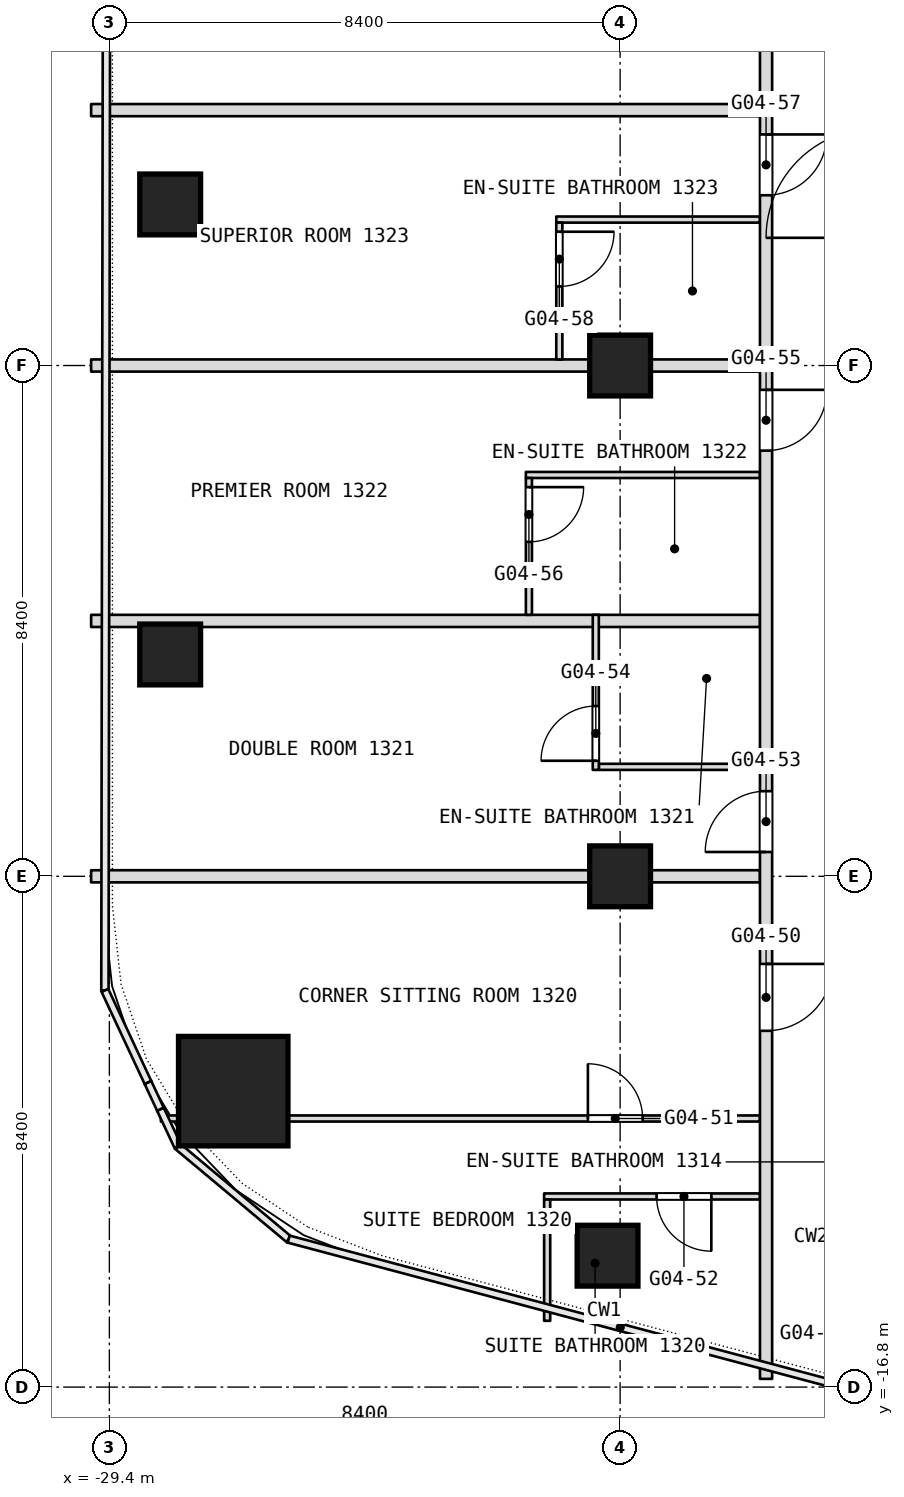
"""IFC4 building model, lengths in metres.
Left out: names, types, materials, properties, quantities, classifications, styles, units other than length and angle.
Written with IfcOpenShell. Run it as: python <this file> out.ifc"""

import sys

from ifc_helpers import new_model, si_unit, direction, frame, frame_2d, origin, origin_2d, place, context, subcontext, project, spatial, rectangle, extrude, element, fill, save


model = new_model("IFC4")
c1 = context("Model", 3, precision=1e-05, world=origin(), true_north=direction((0.0, 1.0)))
c2 = subcontext(c1, "Body", "Model", "MODEL_VIEW")
j1 = project(units=[si_unit("LENGTHUNIT", "METRE"), si_unit("PLANEANGLEUNIT", "RADIAN")], contexts=[c1])
p1 = place(None, origin())
s1 = spatial("IfcSite", under=j1, at=p1, CompositionType="ELEMENT")
p2 = place(p1, origin())
s2 = spatial("IfcBuilding", under=s1, at=p2, CompositionType="ELEMENT")
p3 = place(p2, frame((0.0, 0.0, 61.7)))
s3 = spatial("IfcBuildingStorey", under=s2, at=p3, CompositionType="ELEMENT", Elevation=61.7)
p4 = place(p3, frame((-27.363, -11.933, 0.0), z_axis=(0.0, 0.0, 1.0), x_axis=(1.0, 0.0, 0.0)))
e1 = element("IfcColumn", 1, at=p4, inside=s3, PredefinedType="COLUMN", context=c2, shape_type="SweptSolid", body=[
    extrude(rectangle(XDim=1.8, YDim=1.8, at=origin_2d()), origin(), (0.0, 0.0, 1.0), 3.6),
])
for number, where, z_axis, x_axis in (
    (2, (-21.0, -8.4, 0.0), (0.0, 0.0, 1.0), (1.0, 0.0, 0.0)),
    (3, (-21.0, 0.0, 0.0), (0.0, 0.0, 1.0), (1.0, 0.0, 0.0)),
    (4, (-28.4, -4.752, 0.0), (0.0, 0.0, 1.0), (1.0, 0.0, 0.0)),
    (5, (-28.4, 2.649, 0.0), (0.0, 0.0, 1.0), (1.0, 0.0, 0.0)),
    (6, (-21.207, -14.639, 0.0), (0.0, 0.0, 1.0), (1.0, 0.0, 0.0)),
):
    element("IfcColumn", number, at=place(p3, frame(where, z_axis=z_axis, x_axis=x_axis)), inside=s3, PredefinedType="COLUMN", context=c2, shape_type="SweptSolid", body=[
        extrude(rectangle(XDim=1.0, YDim=1.0, at=origin_2d()), origin(), (0.0, 0.0, 1.0), 3.6),
    ])
p5 = place(p3, frame((-22.25, -13.665, 0.0), z_axis=(0.0, 0.0, 1.0), x_axis=(1.0, 0.0, 0.0)))
e7 = element("IfcWall", 7, at=p5, inside=s3, PredefinedType="PARTITIONING", context=c2, shape_type="SweptSolid", body=[
    extrude(rectangle(XDim=3.55, YDim=0.1, at=frame_2d((1.775, 0.0))), origin(), (0.0, 0.0, 1.0), 3.34),
])
p6 = place(p5, frame((1.85, 0.0, 0.0)))
e8 = element("IfcOpeningElement", 8, at=p6, cuts=e7, PredefinedType="OPENING", context=c2, shape_type="SweptSolid", body=[
    extrude(rectangle(XDim=0.9, YDim=2.1, at=frame_2d((0.45, 1.05))), frame((0.0, 0.05, 0.0), z_axis=(0.0, -1.0, 0.0), x_axis=(1.0, 0.0, 0.0)), (0.0, 0.0, 1.0), 0.1),
])
p7 = place(p3, frame((-28.553, -12.383, 0.0), z_axis=(0.0, 0.0, 1.0), x_axis=(1.0, 0.0, 0.0)))
e9 = element("IfcWall", 9, at=p7, inside=s3, PredefinedType="PARTITIONING", context=c2, shape_type="SweptSolid", body=[
    extrude(rectangle(XDim=0.29, YDim=0.1, at=frame_2d((0.145, 0.0))), origin(), (0.0, 0.0, 1.0), 3.34),
])
p8 = place(p3, frame((-26.463, -12.383, 0.0), z_axis=(0.0, 0.0, 1.0), x_axis=(1.0, 0.0, 0.0)))
e10 = element("IfcWall", 10, at=p8, inside=s3, PredefinedType="PARTITIONING", context=c2, shape_type="SweptSolid", body=[
    extrude(rectangle(XDim=7.763, YDim=0.1, at=frame_2d((3.881, 0.0))), origin(), (0.0, 0.0, 1.0), 3.34),
])
p9 = place(p8, frame((4.933, 0.0, 0.0)))
e11 = element("IfcOpeningElement", 11, at=p9, cuts=e10, PredefinedType="OPENING", context=c2, shape_type="SweptSolid", body=[
    extrude(rectangle(XDim=0.9, YDim=2.1, at=frame_2d((0.45, 1.05))), frame((0.0, 0.05, 0.0), z_axis=(0.0, -1.0, 0.0), x_axis=(1.0, 0.0, 0.0)), (0.0, 0.0, 1.0), 0.1),
])
p10 = place(p3, frame((-29.7, -8.4, 0.0), z_axis=(0.0, 0.0, 1.0), x_axis=(1.0, 0.0, 0.0)))
e12 = element("IfcWall", 12, at=p10, inside=s3, PredefinedType="PARTITIONING", context=c2, shape_type="SweptSolid", body=[
    extrude(rectangle(XDim=11.0, YDim=0.2, at=frame_2d((5.5, 0.0))), origin(), (0.0, 0.0, 1.0), 2.84),
])
p11 = place(p3, frame((-21.35, -6.6, 0.0), z_axis=(0.0, 0.0, 1.0), x_axis=(1.0, 0.0, 0.0)))
e13 = element("IfcWall", 13, at=p11, inside=s3, PredefinedType="PARTITIONING", context=c2, shape_type="SweptSolid", body=[
    extrude(rectangle(XDim=2.65, YDim=0.1, at=frame_2d((1.325, 0.0))), origin(), (0.0, 0.0, 1.0), 3.34),
])
p12 = place(p3, frame((-29.7, -4.2, 0.0), z_axis=(0.0, 0.0, 1.0), x_axis=(1.0, 0.0, 0.0)))
e14 = element("IfcWall", 14, at=p12, inside=s3, PredefinedType="PARTITIONING", context=c2, shape_type="SweptSolid", body=[
    extrude(rectangle(XDim=11.0, YDim=0.2, at=frame_2d((5.5, 0.0))), origin(), (0.0, 0.0, 1.0), 3.34),
])
p13 = place(p3, frame((-22.55, -1.8, 0.0), z_axis=(0.0, 0.0, 1.0), x_axis=(1.0, 0.0, 0.0)))
e15 = element("IfcWall", 15, at=p13, inside=s3, PredefinedType="PARTITIONING", context=c2, shape_type="SweptSolid", body=[
    extrude(rectangle(XDim=3.85, YDim=0.1, at=frame_2d((1.925, 0.0))), origin(), (0.0, 0.0, 1.0), 3.34),
])
p14 = place(p3, frame((-29.7, 0.0, 0.0), z_axis=(0.0, 0.0, 1.0), x_axis=(1.0, 0.0, 0.0)))
e16 = element("IfcWall", 16, at=p14, inside=s3, PredefinedType="PARTITIONING", context=c2, shape_type="SweptSolid", body=[
    extrude(rectangle(XDim=11.0, YDim=0.2, at=frame_2d((5.5, 0.0))), origin(), (0.0, 0.0, 1.0), 2.84),
])
p15 = place(p3, frame((-22.05, 2.4, 0.0), z_axis=(0.0, 0.0, 1.0), x_axis=(1.0, 0.0, 0.0)))
e17 = element("IfcWall", 17, at=p15, inside=s3, PredefinedType="PARTITIONING", context=c2, shape_type="SweptSolid", body=[
    extrude(rectangle(XDim=3.35, YDim=0.1, at=frame_2d((1.675, 0.0))), origin(), (0.0, 0.0, 1.0), 3.34),
])
p16 = place(p3, frame((-29.7, 4.2, 0.0), z_axis=(0.0, 0.0, 1.0), x_axis=(1.0, 0.0, 0.0)))
e18 = element("IfcWall", 18, at=p16, inside=s3, PredefinedType="PARTITIONING", context=c2, shape_type="SweptSolid", body=[
    extrude(rectangle(XDim=11.0, YDim=0.2, at=frame_2d((5.5, 0.0))), origin(), (0.0, 0.0, 1.0), 3.34),
])
p17 = place(p3, frame((-18.6, -16.665, 0.0), z_axis=(0.0, 0.0, 1.0), x_axis=(0.0, 1.0, 0.0)))
e19 = element("IfcWall", 19, at=p17, inside=s3, PredefinedType="PARTITIONING", context=c2, shape_type="SweptSolid", body=[
    extrude(rectangle(XDim=23.565, YDim=0.2, at=frame_2d((11.782, 0.0))), origin(), (0.0, 0.0, 1.0), 3.34),
])
p18 = place(p17, frame((5.724, 0.0, 0.0)))
e20 = element("IfcOpeningElement", 20, at=p18, cuts=e19, PredefinedType="OPENING", context=c2, shape_type="SweptSolid", body=[
    extrude(rectangle(XDim=1.1, YDim=2.1, at=frame_2d((0.55, 1.05))), frame((0.0, 0.1, 0.0), z_axis=(0.0, -1.0, 0.0), x_axis=(1.0, 0.0, 0.0)), (0.0, 0.0, 1.0), 0.2),
])
p19 = place(p17, frame((8.665, 0.0, 0.0)))
e21 = element("IfcOpeningElement", 21, at=p19, cuts=e19, PredefinedType="OPENING", context=c2, shape_type="SweptSolid", body=[
    extrude(rectangle(XDim=1.0, YDim=2.1, at=frame_2d((0.5, 1.05))), frame((0.0, 0.1, 0.0), z_axis=(0.0, -1.0, 0.0), x_axis=(1.0, 0.0, 0.0)), (0.0, 0.0, 1.0), 0.2),
])
p20 = place(p17, frame((15.265, 0.0, 0.0)))
e22 = element("IfcOpeningElement", 22, at=p20, cuts=e19, PredefinedType="OPENING", context=c2, shape_type="SweptSolid", body=[
    extrude(rectangle(XDim=1.0, YDim=2.1, at=frame_2d((0.5, 1.05))), frame((0.0, 0.1, 0.0), z_axis=(0.0, -1.0, 0.0), x_axis=(1.0, 0.0, 0.0)), (0.0, 0.0, 1.0), 0.2),
])
p21 = place(p17, frame((19.465, 0.0, 0.0)))
e23 = element("IfcOpeningElement", 23, at=p21, cuts=e19, PredefinedType="OPENING", context=c2, shape_type="SweptSolid", body=[
    extrude(rectangle(XDim=1.0, YDim=2.1, at=frame_2d((0.5, 1.05))), frame((0.0, 0.1, 0.0), z_axis=(0.0, -1.0, 0.0), x_axis=(1.0, 0.0, 0.0)), (0.0, 0.0, 1.0), 0.2),
])
p22 = place(p3, frame((-21.4, -6.65, 0.0), z_axis=(0.0, 0.0, 1.0), x_axis=(0.0, 1.0, 0.0)))
e24 = element("IfcWall", 24, at=p22, inside=s3, PredefinedType="PARTITIONING", context=c2, shape_type="SweptSolid", body=[
    extrude(rectangle(XDim=2.55, YDim=0.1, at=frame_2d((1.275, 0.0))), origin(), (0.0, 0.0, 1.0), 3.34),
])
p23 = place(p22, frame((0.15, 0.0, 0.0)))
e25 = element("IfcOpeningElement", 25, at=p23, cuts=e24, PredefinedType="OPENING", context=c2, shape_type="SweptSolid", body=[
    extrude(rectangle(XDim=0.9, YDim=2.1, at=frame_2d((0.45, 1.05))), frame((0.0, 0.05, 0.0), z_axis=(0.0, -1.0, 0.0), x_axis=(1.0, 0.0, 0.0)), (0.0, 0.0, 1.0), 0.1),
])
p24 = place(p3, frame((-22.0, 0.1, 0.0), z_axis=(0.0, 0.0, 1.0), x_axis=(0.0, 1.0, 0.0)))
e26 = element("IfcWall", 26, at=p24, inside=s3, PredefinedType="PARTITIONING", context=c2, shape_type="SweptSolid", body=[
    extrude(rectangle(XDim=2.25, YDim=0.1, at=frame_2d((1.125, 0.0))), origin(), (0.0, 0.0, 1.0), 3.34),
])
p25 = place(p24, frame((1.2, 0.0, 0.0)))
e27 = element("IfcOpeningElement", 27, at=p25, cuts=e26, PredefinedType="OPENING", context=c2, shape_type="SweptSolid", body=[
    extrude(rectangle(XDim=0.9, YDim=2.1, at=frame_2d((0.45, 1.05))), frame((0.0, 0.05, 0.0), z_axis=(0.0, -1.0, 0.0), x_axis=(1.0, 0.0, 0.0)), (0.0, 0.0, 1.0), 0.1),
])
p26 = place(p3, frame((-22.2, -15.71, 0.0), z_axis=(0.0, 0.0, 1.0), x_axis=(0.0, 1.0, 0.0)))
e28 = element("IfcWall", 28, at=p26, inside=s3, PredefinedType="PARTITIONING", context=c2, shape_type="SweptSolid", body=[
    extrude(rectangle(XDim=1.995, YDim=0.1, at=frame_2d((0.998, 0.0))), origin(), (0.0, 0.0, 1.0), 3.34),
])
p27 = place(p3, frame((-22.5, -4.1, 0.0), z_axis=(0.0, 0.0, 1.0), x_axis=(0.0, 1.0, 0.0)))
e29 = element("IfcWall", 29, at=p27, inside=s3, PredefinedType="PARTITIONING", context=c2, shape_type="SweptSolid", body=[
    extrude(rectangle(XDim=2.25, YDim=0.1, at=frame_2d((1.125, 0.0))), origin(), (0.0, 0.0, 1.0), 3.34),
])
p28 = place(p27, frame((1.2, 0.0, 0.0)))
e30 = element("IfcOpeningElement", 30, at=p28, cuts=e29, PredefinedType="OPENING", context=c2, shape_type="SweptSolid", body=[
    extrude(rectangle(XDim=0.9, YDim=2.1, at=frame_2d((0.45, 1.05))), frame((0.0, 0.05, 0.0), z_axis=(0.0, -1.0, 0.0), x_axis=(1.0, 0.0, 0.0)), (0.0, 0.0, 1.0), 0.1),
])
p29 = place(p6, origin())
e31 = element("IfcDoor", 31, at=p29, inside=s3, OperationType="SINGLE_SWING_RIGHT", PredefinedType="DOOR", context=c2, shape_type="SweptSolid", body=[
    extrude(rectangle(XDim=0.9, YDim=2.1, at=frame_2d((0.45, 1.05))), frame((0.0, 0.025, 0.0), z_axis=(0.0, -1.0, 0.0), x_axis=(1.0, 0.0, 0.0)), (0.0, 0.0, 1.0), 0.05),
])
fill(e8, e31)
p30 = place(p9, origin())
e32 = element("IfcDoor", 32, at=p30, inside=s3, OperationType="SINGLE_SWING_LEFT", PredefinedType="DOOR", context=c2, shape_type="SweptSolid", body=[
    extrude(rectangle(XDim=0.9, YDim=2.1, at=frame_2d((0.45, 1.05))), frame((0.0, 0.025, 0.0), z_axis=(0.0, -1.0, 0.0), x_axis=(1.0, 0.0, 0.0)), (0.0, 0.0, 1.0), 0.05),
])
fill(e11, e32)
p31 = place(p18, origin())
e33 = element("IfcDoor", 33, at=p31, inside=s3, OperationType="SINGLE_SWING_RIGHT", PredefinedType="DOOR", context=c2, shape_type="SweptSolid", body=[
    extrude(rectangle(XDim=1.1, YDim=2.1, at=frame_2d((0.55, 1.05))), frame((0.0, 0.025, 0.0), z_axis=(0.0, -1.0, 0.0), x_axis=(1.0, 0.0, 0.0)), (0.0, 0.0, 1.0), 0.05),
])
fill(e20, e33)
p32 = place(p19, origin())
e34 = element("IfcDoor", 34, at=p32, inside=s3, OperationType="SINGLE_SWING_RIGHT", PredefinedType="DOOR", context=c2, shape_type="SweptSolid", body=[
    extrude(rectangle(XDim=1.0, YDim=2.1, at=frame_2d((0.5, 1.05))), frame((0.0, 0.025, 0.0), z_axis=(0.0, -1.0, 0.0), x_axis=(1.0, 0.0, 0.0)), (0.0, 0.0, 1.0), 0.05),
])
fill(e21, e34)
p33 = place(p20, origin())
e35 = element("IfcDoor", 35, at=p33, inside=s3, OperationType="SINGLE_SWING_RIGHT", PredefinedType="DOOR", context=c2, shape_type="SweptSolid", body=[
    extrude(rectangle(XDim=1.0, YDim=2.1, at=frame_2d((0.5, 1.05))), frame((0.0, 0.025, 0.0), z_axis=(0.0, -1.0, 0.0), x_axis=(1.0, 0.0, 0.0)), (0.0, 0.0, 1.0), 0.05),
])
fill(e22, e35)
p34 = place(p21, origin())
e36 = element("IfcDoor", 36, at=p34, inside=s3, OperationType="SINGLE_SWING_RIGHT", PredefinedType="DOOR", context=c2, shape_type="SweptSolid", body=[
    extrude(rectangle(XDim=1.0, YDim=2.1, at=frame_2d((0.5, 1.05))), frame((0.0, 0.025, 0.0), z_axis=(0.0, -1.0, 0.0), x_axis=(1.0, 0.0, 0.0)), (0.0, 0.0, 1.0), 0.05),
])
fill(e23, e36)
p35 = place(p23, origin())
e37 = element("IfcDoor", 37, at=p35, inside=s3, OperationType="SINGLE_SWING_RIGHT", PredefinedType="DOOR", context=c2, shape_type="SweptSolid", body=[
    extrude(rectangle(XDim=0.9, YDim=2.1, at=frame_2d((0.45, 1.05))), frame((0.0, 0.025, 0.0), z_axis=(0.0, -1.0, 0.0), x_axis=(1.0, 0.0, 0.0)), (0.0, 0.0, 1.0), 0.05),
])
fill(e25, e37)
p36 = place(p25, origin())
e38 = element("IfcDoor", 38, at=p36, inside=s3, OperationType="SINGLE_SWING_LEFT", PredefinedType="DOOR", context=c2, shape_type="SweptSolid", body=[
    extrude(rectangle(XDim=0.9, YDim=2.1, at=frame_2d((0.45, 1.05))), frame((0.0, 0.025, 0.0), z_axis=(0.0, -1.0, 0.0), x_axis=(1.0, 0.0, 0.0)), (0.0, 0.0, 1.0), 0.05),
])
fill(e27, e38)
p37 = place(p28, origin())
e39 = element("IfcDoor", 39, at=p37, inside=s3, OperationType="SINGLE_SWING_LEFT", PredefinedType="DOOR", context=c2, shape_type="SweptSolid", body=[
    extrude(rectangle(XDim=0.9, YDim=2.1, at=frame_2d((0.45, 1.05))), frame((0.0, 0.025, 0.0), z_axis=(0.0, -1.0, 0.0), x_axis=(1.0, 0.0, 0.0)), (0.0, 0.0, 1.0), 0.05),
])
fill(e30, e39)
save(model, sys.argv[1])
